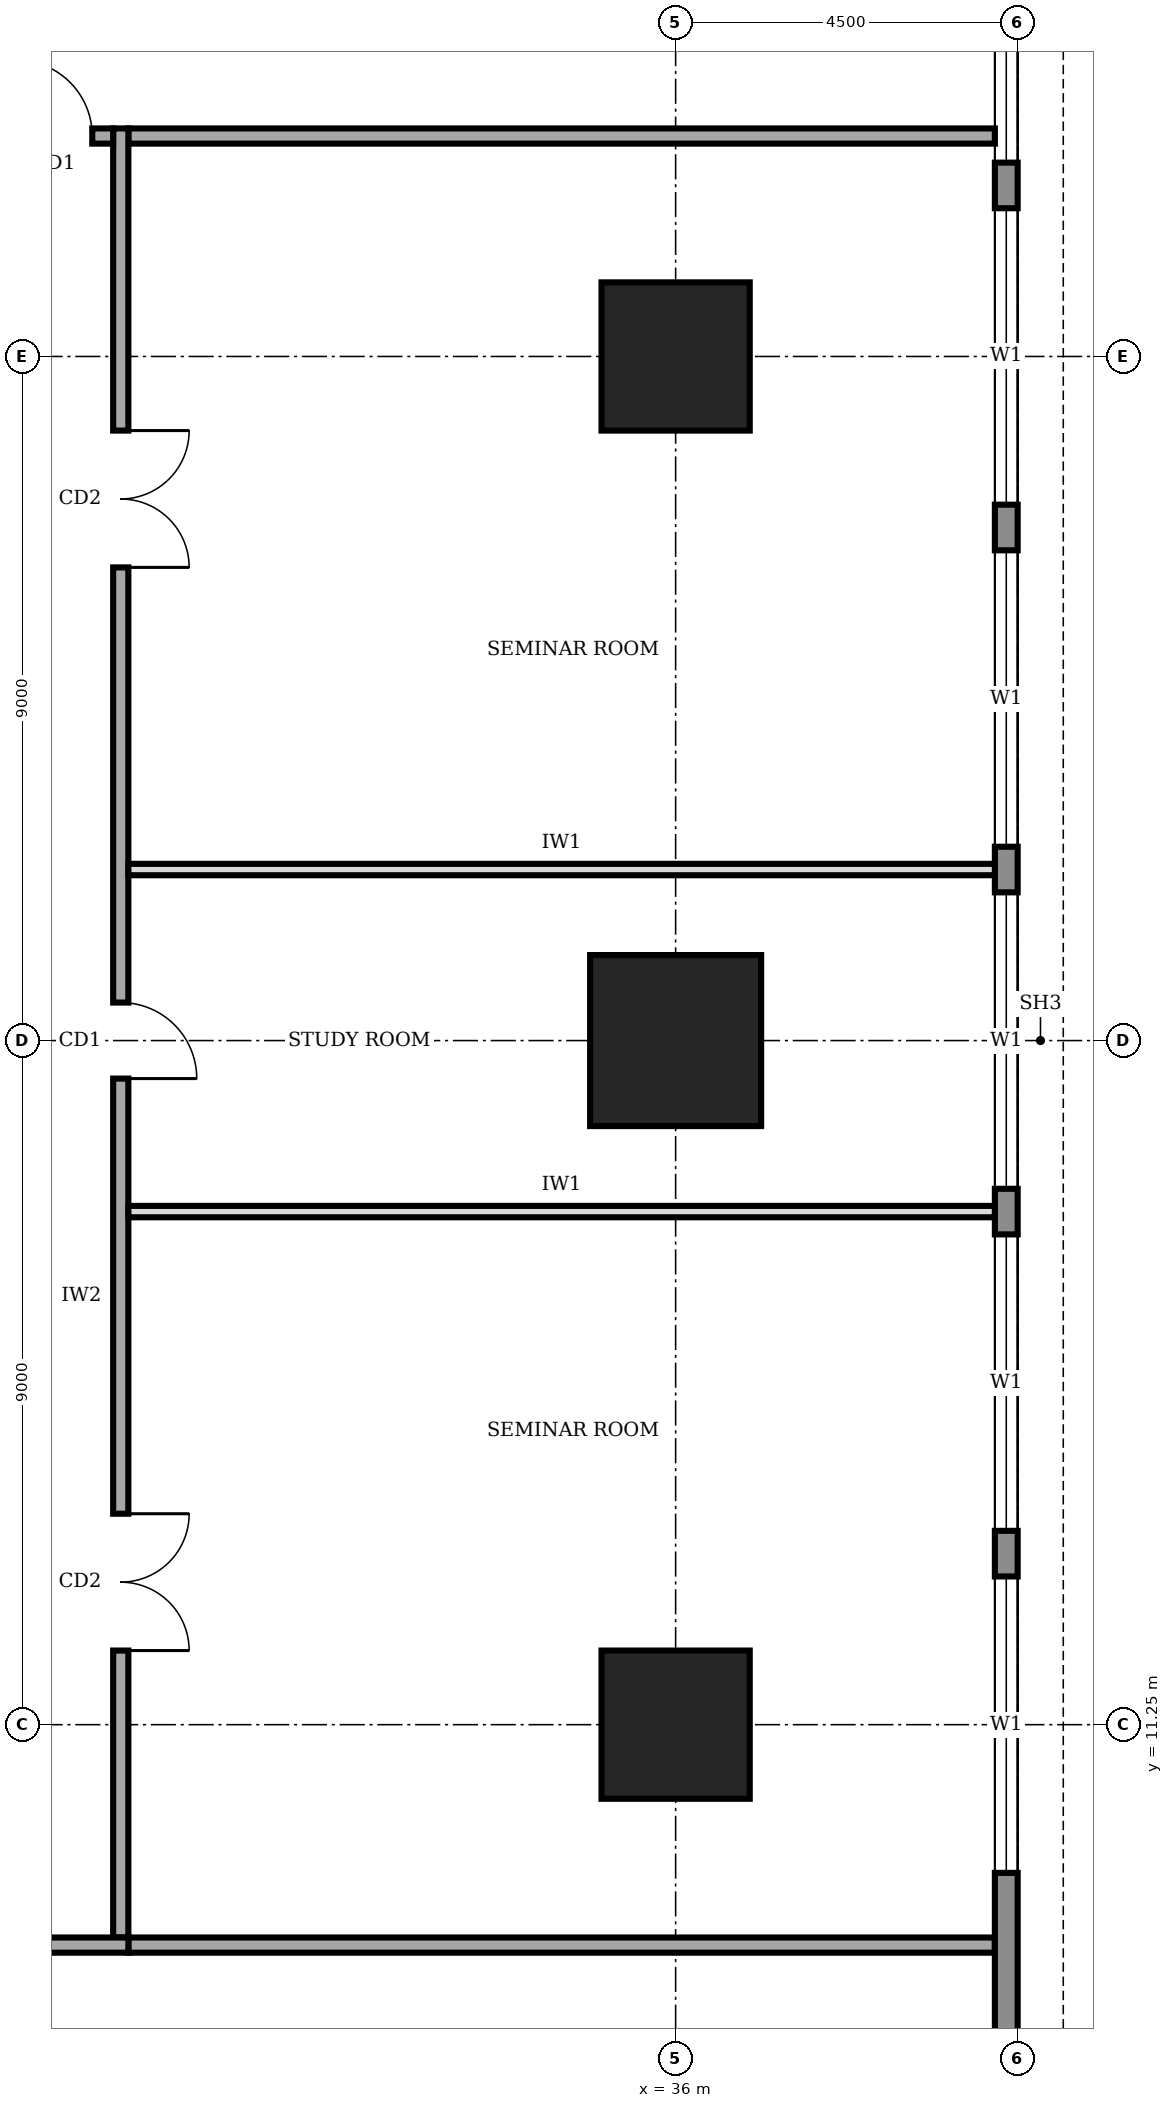
"""IFC4 building model, lengths in metres.
Left out: names, types, materials, properties, quantities, classifications, styles, units other than length and angle.
Written with IfcOpenShell. Run it as: python <this file> out.ifc"""

import sys

from ifc_helpers import new_model, si_unit, direction, frame, frame_2d, origin, origin_2d, place, context, subcontext, project, spatial, rectangle, extrude, element, fill, save


model = new_model("IFC4")
c1 = context("Model", 3, precision=1e-05, world=origin(), true_north=direction((0.0, 1.0)))
c2 = subcontext(c1, "Body", "Model", "MODEL_VIEW")
j1 = project(units=[si_unit("LENGTHUNIT", "METRE"), si_unit("PLANEANGLEUNIT", "RADIAN")], contexts=[c1])
p1 = place(None, origin())
s1 = spatial("IfcSite", under=j1, at=p1, CompositionType="ELEMENT")
p2 = place(p1, origin())
s2 = spatial("IfcBuilding", under=s1, at=p2, CompositionType="ELEMENT")
p3 = place(p2, frame((0.0, 0.0, 221.0)))
s3 = spatial("IfcBuildingStorey", under=s2, at=p3, CompositionType="ELEMENT", Elevation=221.0)
p4 = place(p3, frame((36.0, 11.25, 0.0), z_axis=(0.0, 0.0, 1.0), x_axis=(1.0, 0.0, 0.0)))
e1 = element("IfcColumn", 1, at=p4, inside=s3, PredefinedType="COLUMN", context=c2, shape_type="SweptSolid", body=[
    extrude(rectangle(XDim=1.95, YDim=1.95, at=origin_2d()), origin(), (0.0, 0.0, 1.0), 4.0),
])
p5 = place(p3, frame((36.0, 20.25, 0.0), z_axis=(0.0, 0.0, 1.0), x_axis=(1.0, 0.0, 0.0)))
e2 = element("IfcColumn", 2, at=p5, inside=s3, PredefinedType="COLUMN", context=c2, shape_type="SweptSolid", body=[
    extrude(rectangle(XDim=2.25, YDim=2.25, at=origin_2d()), origin(), (0.0, 0.0, 1.0), 4.0),
])
p6 = place(p3, frame((36.0, 29.25, 0.0), z_axis=(0.0, 0.0, 1.0), x_axis=(1.0, 0.0, 0.0)))
e3 = element("IfcColumn", 3, at=p6, inside=s3, PredefinedType="COLUMN", context=c2, shape_type="SweptSolid", body=[
    extrude(rectangle(XDim=1.95, YDim=1.95, at=origin_2d()), origin(), (0.0, 0.0, 1.0), 4.0),
])
p7 = place(p3, frame((40.35, 4.52, 0.0), z_axis=(0.0, 0.0, 1.0), x_axis=(0.0, 1.0, 0.0)))
e4 = element("IfcWall", 4, at=p7, inside=s3, PredefinedType="STANDARD", context=c2, shape_type="SweptSolid", body=[
    extrude(rectangle(XDim=31.46, YDim=0.3, at=frame_2d((15.73, 0.0))), origin(), (0.0, 0.0, 1.0), 3.75),
])
p8 = place(p7, frame((4.78, 0.0, 0.9)))
e5 = element("IfcOpeningElement", 5, at=p8, cuts=e4, PredefinedType="OPENING", context=c2, shape_type="SweptSolid", body=[
    extrude(rectangle(XDim=3.9, YDim=2.2, at=frame_2d((1.95, 1.1))), frame((0.0, 0.16, 0.0), z_axis=(0.0, -1.0, 0.0), x_axis=(1.0, 0.0, 0.0)), (0.0, 0.0, 1.0), 0.32),
])
p9 = place(p7, frame((9.28, 0.0, 0.9)))
e6 = element("IfcOpeningElement", 6, at=p9, cuts=e4, PredefinedType="OPENING", context=c2, shape_type="SweptSolid", body=[
    extrude(rectangle(XDim=3.9, YDim=2.2, at=frame_2d((1.95, 1.1))), frame((0.0, 0.16, 0.0), z_axis=(0.0, -1.0, 0.0), x_axis=(1.0, 0.0, 0.0)), (0.0, 0.0, 1.0), 0.32),
])
p10 = place(p7, frame((13.78, 0.0, 0.9)))
e7 = element("IfcOpeningElement", 7, at=p10, cuts=e4, PredefinedType="OPENING", context=c2, shape_type="SweptSolid", body=[
    extrude(rectangle(XDim=3.9, YDim=2.2, at=frame_2d((1.95, 1.1))), frame((0.0, 0.16, 0.0), z_axis=(0.0, -1.0, 0.0), x_axis=(1.0, 0.0, 0.0)), (0.0, 0.0, 1.0), 0.32),
])
p11 = place(p7, frame((18.28, 0.0, 0.9)))
e8 = element("IfcOpeningElement", 8, at=p11, cuts=e4, PredefinedType="OPENING", context=c2, shape_type="SweptSolid", body=[
    extrude(rectangle(XDim=3.9, YDim=2.2, at=frame_2d((1.95, 1.1))), frame((0.0, 0.16, 0.0), z_axis=(0.0, -1.0, 0.0), x_axis=(1.0, 0.0, 0.0)), (0.0, 0.0, 1.0), 0.32),
])
p12 = place(p7, frame((22.78, 0.0, 0.9)))
e9 = element("IfcOpeningElement", 9, at=p12, cuts=e4, PredefinedType="OPENING", context=c2, shape_type="SweptSolid", body=[
    extrude(rectangle(XDim=3.9, YDim=2.2, at=frame_2d((1.95, 1.1))), frame((0.0, 0.16, 0.0), z_axis=(0.0, -1.0, 0.0), x_axis=(1.0, 0.0, 0.0)), (0.0, 0.0, 1.0), 0.32),
])
p13 = place(p7, frame((27.28, 0.0, 0.9)))
e10 = element("IfcOpeningElement", 10, at=p13, cuts=e4, PredefinedType="OPENING", context=c2, shape_type="SweptSolid", body=[
    extrude(rectangle(XDim=3.9, YDim=2.2, at=frame_2d((1.95, 1.1))), frame((0.0, 0.16, 0.0), z_axis=(0.0, -1.0, 0.0), x_axis=(1.0, 0.0, 0.0)), (0.0, 0.0, 1.0), 0.32),
])
p14 = place(p3, frame((11.9, 8.35, 0.0), z_axis=(0.0, 0.0, 1.0), x_axis=(1.0, 0.0, 0.0)))
e11 = element("IfcWall", 11, at=p14, inside=s3, PredefinedType="SOLIDWALL", context=c2, shape_type="SweptSolid", body=[
    extrude(rectangle(XDim=16.9, YDim=0.2, at=frame_2d((8.45, 0.0))), origin(), (0.0, 0.0, 1.0), 3.75),
])
p15 = place(p14, frame((2.05, 0.0, 0.0)))
e12 = element("IfcOpeningElement", 12, at=p15, cuts=e11, PredefinedType="OPENING", context=c2, shape_type="SweptSolid", body=[
    extrude(rectangle(XDim=1.8, YDim=2.1, at=frame_2d((0.9, 1.05))), frame((0.0, 0.11, 0.0), z_axis=(0.0, -1.0, 0.0), x_axis=(1.0, 0.0, 0.0)), (0.0, 0.0, 1.0), 0.22),
])
p16 = place(p14, frame((10.6, 0.0, 0.0)))
e13 = element("IfcOpeningElement", 13, at=p16, cuts=e11, PredefinedType="OPENING", context=c2, shape_type="SweptSolid", body=[
    extrude(rectangle(XDim=1.8, YDim=2.1, at=frame_2d((0.9, 1.05))), frame((0.0, 0.11, 0.0), z_axis=(0.0, -1.0, 0.0), x_axis=(1.0, 0.0, 0.0)), (0.0, 0.0, 1.0), 0.22),
])
p17 = place(p3, frame((28.7, 8.45, 0.0), z_axis=(0.0, 0.0, 1.0), x_axis=(0.0, 1.0, 0.0)))
e14 = element("IfcWall", 14, at=p17, inside=s3, PredefinedType="SOLIDWALL", context=c2, shape_type="SweptSolid", body=[
    extrude(rectangle(XDim=23.8, YDim=0.2, at=frame_2d((11.9, 0.0))), origin(), (0.0, 0.0, 1.0), 3.75),
])
p18 = place(p17, frame((3.775, 0.0, 0.0)))
e15 = element("IfcOpeningElement", 15, at=p18, cuts=e14, PredefinedType="OPENING", context=c2, shape_type="SweptSolid", body=[
    extrude(rectangle(XDim=1.8, YDim=2.1, at=frame_2d((0.9, 1.05))), frame((0.0, 0.11, 0.0), z_axis=(0.0, -1.0, 0.0), x_axis=(1.0, 0.0, 0.0)), (0.0, 0.0, 1.0), 0.22),
])
p19 = place(p17, frame((11.3, 0.0, 0.0)))
e16 = element("IfcOpeningElement", 16, at=p19, cuts=e14, PredefinedType="OPENING", context=c2, shape_type="SweptSolid", body=[
    extrude(rectangle(XDim=1.0, YDim=2.1, at=frame_2d((0.5, 1.05))), frame((0.0, 0.11, 0.0), z_axis=(0.0, -1.0, 0.0), x_axis=(1.0, 0.0, 0.0)), (0.0, 0.0, 1.0), 0.22),
])
p20 = place(p17, frame((18.025, 0.0, 0.0)))
e17 = element("IfcOpeningElement", 17, at=p20, cuts=e14, PredefinedType="OPENING", context=c2, shape_type="SweptSolid", body=[
    extrude(rectangle(XDim=1.8, YDim=2.1, at=frame_2d((0.9, 1.05))), frame((0.0, 0.11, 0.0), z_axis=(0.0, -1.0, 0.0), x_axis=(1.0, 0.0, 0.0)), (0.0, 0.0, 1.0), 0.22),
])
p21 = place(p3, frame((28.6, 32.15, 0.0), z_axis=(0.0, 0.0, 1.0), x_axis=(-1.0, 0.0, 0.0)))
e18 = element("IfcWall", 18, at=p21, inside=s3, PredefinedType="SOLIDWALL", context=c2, shape_type="SweptSolid", body=[
    extrude(rectangle(XDim=16.9, YDim=0.2, at=frame_2d((8.45, 0.0))), origin(), (0.0, 0.0, 1.0), 3.75),
])
p22 = place(p21, frame((15.425, 0.0, 0.0)))
e19 = element("IfcOpeningElement", 19, at=p22, cuts=e18, PredefinedType="OPENING", context=c2, shape_type="SweptSolid", body=[
    extrude(rectangle(XDim=1.0, YDim=2.1, at=frame_2d((0.5, 1.05))), frame((0.0, 0.11, 0.0), z_axis=(0.0, -1.0, 0.0), x_axis=(1.0, 0.0, 0.0)), (0.0, 0.0, 1.0), 0.22),
])
p23 = place(p21, frame((12.35, 0.0, 0.0)))
e20 = element("IfcOpeningElement", 20, at=p23, cuts=e18, PredefinedType="OPENING", context=c2, shape_type="SweptSolid", body=[
    extrude(rectangle(XDim=1.0, YDim=2.1, at=frame_2d((0.5, 1.05))), frame((0.0, 0.11, 0.0), z_axis=(0.0, -1.0, 0.0), x_axis=(1.0, 0.0, 0.0)), (0.0, 0.0, 1.0), 0.22),
])
p24 = place(p21, frame((5.6, 0.0, 0.0)))
e21 = element("IfcOpeningElement", 21, at=p24, cuts=e18, PredefinedType="OPENING", context=c2, shape_type="SweptSolid", body=[
    extrude(rectangle(XDim=1.0, YDim=2.1, at=frame_2d((0.5, 1.05))), frame((0.0, 0.11, 0.0), z_axis=(0.0, -1.0, 0.0), x_axis=(1.0, 0.0, 0.0)), (0.0, 0.0, 1.0), 0.22),
])
p25 = place(p21, frame((0.275, 0.0, 0.0)))
e22 = element("IfcOpeningElement", 22, at=p25, cuts=e18, PredefinedType="OPENING", context=c2, shape_type="SweptSolid", body=[
    extrude(rectangle(XDim=1.0, YDim=2.1, at=frame_2d((0.5, 1.05))), frame((0.0, 0.11, 0.0), z_axis=(0.0, -1.0, 0.0), x_axis=(1.0, 0.0, 0.0)), (0.0, 0.0, 1.0), 0.22),
])
for number, where, z_axis, x_axis in (
    (23, (28.8, 8.35, 0.0), (0.0, 0.0, 1.0), (1.0, 0.0, 0.0)),
    (24, (28.8, 32.15, 0.0), (0.0, 0.0, 1.0), (1.0, 0.0, 0.0)),
):
    element("IfcWall", number, at=place(p3, frame(where, z_axis=z_axis, x_axis=x_axis)), inside=s3, PredefinedType="SOLIDWALL", context=c2, shape_type="SweptSolid", body=[
        extrude(rectangle(XDim=11.4, YDim=0.2, at=frame_2d((5.7, 0.0))), origin(), (0.0, 0.0, 1.0), 3.75),
    ])
for number, where, z_axis, x_axis in (
    (25, (28.8, 18.0, 0.0), (0.0, 0.0, 1.0), (1.0, 0.0, 0.0)),
    (26, (28.8, 22.5, 0.0), (0.0, 0.0, 1.0), (1.0, 0.0, 0.0)),
):
    element("IfcWall", number, at=place(p3, frame(where, z_axis=z_axis, x_axis=x_axis)), inside=s3, PredefinedType="PARTITIONING", context=c2, shape_type="SweptSolid", body=[
        extrude(rectangle(XDim=11.4, YDim=0.15, at=frame_2d((5.7, 0.0))), origin(), (0.0, 0.0, 1.0), 3.75),
    ])
p26 = place(p8, origin())
e27 = element("IfcWindow", 27, at=p26, inside=s3, PartitioningType="SINGLE_PANEL", PredefinedType="WINDOW", context=c2, shape_type="SweptSolid", body=[
    extrude(rectangle(XDim=3.9, YDim=2.2, at=frame_2d((1.95, 1.1))), frame((0.0, 0.03, 0.0), z_axis=(0.0, -1.0, 0.0), x_axis=(1.0, 0.0, 0.0)), (0.0, 0.0, 1.0), 0.06),
])
fill(e5, e27)
p27 = place(p9, origin())
e28 = element("IfcWindow", 28, at=p27, inside=s3, PartitioningType="SINGLE_PANEL", PredefinedType="WINDOW", context=c2, shape_type="SweptSolid", body=[
    extrude(rectangle(XDim=3.9, YDim=2.2, at=frame_2d((1.95, 1.1))), frame((0.0, 0.03, 0.0), z_axis=(0.0, -1.0, 0.0), x_axis=(1.0, 0.0, 0.0)), (0.0, 0.0, 1.0), 0.06),
])
fill(e6, e28)
p28 = place(p10, origin())
e29 = element("IfcWindow", 29, at=p28, inside=s3, PartitioningType="SINGLE_PANEL", PredefinedType="WINDOW", context=c2, shape_type="SweptSolid", body=[
    extrude(rectangle(XDim=3.9, YDim=2.2, at=frame_2d((1.95, 1.1))), frame((0.0, 0.03, 0.0), z_axis=(0.0, -1.0, 0.0), x_axis=(1.0, 0.0, 0.0)), (0.0, 0.0, 1.0), 0.06),
])
fill(e7, e29)
p29 = place(p11, origin())
e30 = element("IfcWindow", 30, at=p29, inside=s3, PartitioningType="SINGLE_PANEL", PredefinedType="WINDOW", context=c2, shape_type="SweptSolid", body=[
    extrude(rectangle(XDim=3.9, YDim=2.2, at=frame_2d((1.95, 1.1))), frame((0.0, 0.03, 0.0), z_axis=(0.0, -1.0, 0.0), x_axis=(1.0, 0.0, 0.0)), (0.0, 0.0, 1.0), 0.06),
])
fill(e8, e30)
p30 = place(p12, origin())
e31 = element("IfcWindow", 31, at=p30, inside=s3, PartitioningType="SINGLE_PANEL", PredefinedType="WINDOW", context=c2, shape_type="SweptSolid", body=[
    extrude(rectangle(XDim=3.9, YDim=2.2, at=frame_2d((1.95, 1.1))), frame((0.0, 0.03, 0.0), z_axis=(0.0, -1.0, 0.0), x_axis=(1.0, 0.0, 0.0)), (0.0, 0.0, 1.0), 0.06),
])
fill(e9, e31)
p31 = place(p13, origin())
e32 = element("IfcWindow", 32, at=p31, inside=s3, PartitioningType="SINGLE_PANEL", PredefinedType="WINDOW", context=c2, shape_type="SweptSolid", body=[
    extrude(rectangle(XDim=3.9, YDim=2.2, at=frame_2d((1.95, 1.1))), frame((0.0, 0.03, 0.0), z_axis=(0.0, -1.0, 0.0), x_axis=(1.0, 0.0, 0.0)), (0.0, 0.0, 1.0), 0.06),
])
fill(e10, e32)
p32 = place(p18, frame((1.8, 0.0, 0.0), z_axis=(0.0, 0.0, 1.0), x_axis=(-1.0, 0.0, 0.0)))
e33 = element("IfcDoor", 33, at=p32, inside=s3, OperationType="DOUBLE_DOOR_SINGLE_SWING", PredefinedType="DOOR", context=c2, shape_type="SweptSolid", body=[
    extrude(rectangle(XDim=1.8, YDim=2.1, at=frame_2d((0.9, 1.05))), frame((0.0, 0.025, 0.0), z_axis=(0.0, -1.0, 0.0), x_axis=(1.0, 0.0, 0.0)), (0.0, 0.0, 1.0), 0.05),
])
fill(e15, e33)
p33 = place(p19, frame((1.0, 0.0, 0.0), z_axis=(0.0, 0.0, 1.0), x_axis=(-1.0, 0.0, 0.0)))
e34 = element("IfcDoor", 34, at=p33, inside=s3, OperationType="SINGLE_SWING_RIGHT", PredefinedType="DOOR", context=c2, shape_type="SweptSolid", body=[
    extrude(rectangle(XDim=1.0, YDim=2.1, at=frame_2d((0.5, 1.05))), frame((0.0, 0.025, 0.0), z_axis=(0.0, -1.0, 0.0), x_axis=(1.0, 0.0, 0.0)), (0.0, 0.0, 1.0), 0.05),
])
fill(e16, e34)
p34 = place(p20, frame((1.8, 0.0, 0.0), z_axis=(0.0, 0.0, 1.0), x_axis=(-1.0, 0.0, 0.0)))
e35 = element("IfcDoor", 35, at=p34, inside=s3, OperationType="DOUBLE_DOOR_SINGLE_SWING", PredefinedType="DOOR", context=c2, shape_type="SweptSolid", body=[
    extrude(rectangle(XDim=1.8, YDim=2.1, at=frame_2d((0.9, 1.05))), frame((0.0, 0.025, 0.0), z_axis=(0.0, -1.0, 0.0), x_axis=(1.0, 0.0, 0.0)), (0.0, 0.0, 1.0), 0.05),
])
fill(e17, e35)
p35 = place(p25, frame((1.0, 0.0, 0.0), z_axis=(0.0, 0.0, 1.0), x_axis=(-1.0, 0.0, 0.0)))
e36 = element("IfcDoor", 36, at=p35, inside=s3, OperationType="SINGLE_SWING_LEFT", PredefinedType="DOOR", context=c2, shape_type="SweptSolid", body=[
    extrude(rectangle(XDim=1.0, YDim=2.1, at=frame_2d((0.5, 1.05))), frame((0.0, 0.025, 0.0), z_axis=(0.0, -1.0, 0.0), x_axis=(1.0, 0.0, 0.0)), (0.0, 0.0, 1.0), 0.05),
])
fill(e22, e36)
save(model, sys.argv[1])
